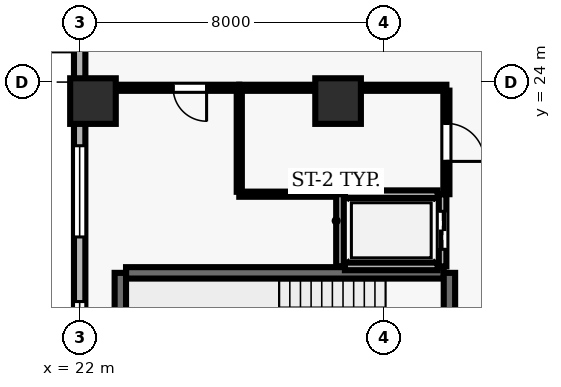
"""IFC4 building model, lengths in metres.
Left out: names, types, materials, properties, quantities, classifications, styles, units other than length and angle.
Written with IfcOpenShell. Run it as: python <this file> out.ifc"""

import sys

from ifc_helpers import new_model, si_unit, direction, frame, frame_2d, origin, origin_2d, place, context, subcontext, project, spatial, rectangle, extrude, element, fill, save


model = new_model("IFC4")
c1 = context("Model", 3, precision=1e-05, world=origin(), true_north=direction((0.0, 1.0)))
c2 = subcontext(c1, "Body", "Model", "MODEL_VIEW")
j1 = project(units=[si_unit("LENGTHUNIT", "METRE"), si_unit("PLANEANGLEUNIT", "RADIAN")], contexts=[c1])
p1 = place(None, origin())
s1 = spatial("IfcSite", under=j1, at=p1, CompositionType="ELEMENT")
p2 = place(p1, origin())
s2 = spatial("IfcBuilding", under=s1, at=p2, CompositionType="ELEMENT")
p3 = place(p2, frame((0.0, 0.0, 142.4)))
s3 = spatial("IfcBuildingStorey", under=s2, at=p3, CompositionType="ELEMENT", Elevation=142.4)
for number, where, z_axis, x_axis in (
    (1, (22.35, 23.5, 0.0), (0.0, 0.0, 1.0), (1.0, 0.0, 0.0)),
    (2, (28.8, 23.5, 0.0), (0.0, 0.0, 1.0), (1.0, 0.0, 0.0)),
):
    element("IfcColumn", number, at=place(p3, frame(where, z_axis=z_axis, x_axis=x_axis)), inside=s3, PredefinedType="COLUMN", context=c2, shape_type="SweptSolid", body=[
        extrude(rectangle(XDim=1.2, YDim=1.2, at=origin_2d()), origin(), (0.0, 0.0, 1.0), 3.9),
    ])
p4 = place(p3, frame((22.0, 46.1, 0.0), z_axis=(0.0, 0.0, 1.0), x_axis=(0.0, -1.0, 0.0)))
e3 = element("IfcWall", 3, at=p4, inside=s3, PredefinedType="SOLIDWALL", context=c2, shape_type="SweptSolid", body=[
    extrude(rectangle(XDim=43.6, YDim=0.3, at=frame_2d((21.8, 0.0))), origin(), (0.0, 0.0, 1.0), 3.69),
])
p5 = place(p4, frame((12.7, 0.0, 0.0)))
e4 = element("IfcOpeningElement", 4, at=p5, cuts=e3, PredefinedType="OPENING", context=c2, shape_type="SweptSolid", body=[
    extrude(rectangle(XDim=1.0, YDim=2.2, at=frame_2d((0.5, 1.1))), frame((0.0, 0.16, 0.0), z_axis=(0.0, -1.0, 0.0), x_axis=(1.0, 0.0, 0.0)), (0.0, 0.0, 1.0), 0.32),
])
p6 = place(p4, frame((1.525, 0.0, 0.9)))
e5 = element("IfcOpeningElement", 5, at=p6, cuts=e3, PredefinedType="OPENING", context=c2, shape_type="SweptSolid", body=[
    extrude(rectangle(XDim=2.4, YDim=2.2, at=frame_2d((1.2, 1.1))), frame((0.0, 0.16, 0.0), z_axis=(0.0, -1.0, 0.0), x_axis=(1.0, 0.0, 0.0)), (0.0, 0.0, 1.0), 0.32),
])
p7 = place(p4, frame((6.975, 0.0, 0.9)))
e6 = element("IfcOpeningElement", 6, at=p7, cuts=e3, PredefinedType="OPENING", context=c2, shape_type="SweptSolid", body=[
    extrude(rectangle(XDim=2.4, YDim=2.2, at=frame_2d((1.2, 1.1))), frame((0.0, 0.16, 0.0), z_axis=(0.0, -1.0, 0.0), x_axis=(1.0, 0.0, 0.0)), (0.0, 0.0, 1.0), 0.32),
])
p8 = place(p4, frame((16.975, 0.0, 0.9)))
e7 = element("IfcOpeningElement", 7, at=p8, cuts=e3, PredefinedType="OPENING", context=c2, shape_type="SweptSolid", body=[
    extrude(rectangle(XDim=2.4, YDim=2.2, at=frame_2d((1.2, 1.1))), frame((0.0, 0.16, 0.0), z_axis=(0.0, -1.0, 0.0), x_axis=(1.0, 0.0, 0.0)), (0.0, 0.0, 1.0), 0.32),
])
p9 = place(p4, frame((23.775, 0.0, 0.9)))
e8 = element("IfcOpeningElement", 8, at=p9, cuts=e3, PredefinedType="OPENING", context=c2, shape_type="SweptSolid", body=[
    extrude(rectangle(XDim=2.4, YDim=2.2, at=frame_2d((1.2, 1.1))), frame((0.0, 0.16, 0.0), z_axis=(0.0, -1.0, 0.0), x_axis=(1.0, 0.0, 0.0)), (0.0, 0.0, 1.0), 0.32),
])
p10 = place(p4, frame((27.875, 0.0, 0.9)))
e9 = element("IfcOpeningElement", 9, at=p10, cuts=e3, PredefinedType="OPENING", context=c2, shape_type="SweptSolid", body=[
    extrude(rectangle(XDim=2.4, YDim=2.2, at=frame_2d((1.2, 1.1))), frame((0.0, 0.16, 0.0), z_axis=(0.0, -1.0, 0.0), x_axis=(1.0, 0.0, 0.0)), (0.0, 0.0, 1.0), 0.32),
])
p11 = place(p4, frame((34.225, 0.0, 0.9)))
e10 = element("IfcOpeningElement", 10, at=p11, cuts=e3, PredefinedType="OPENING", context=c2, shape_type="SweptSolid", body=[
    extrude(rectangle(XDim=2.4, YDim=2.2, at=frame_2d((1.2, 1.1))), frame((0.0, 0.16, 0.0), z_axis=(0.0, -1.0, 0.0), x_axis=(1.0, 0.0, 0.0)), (0.0, 0.0, 1.0), 0.32),
])
p12 = place(p3, frame((31.58, 18.98, 0.0), z_axis=(0.0, 0.0, 1.0), x_axis=(-1.0, 0.0, 0.0)))
e11 = element("IfcWall", 11, at=p12, inside=s3, PredefinedType="SHEAR", context=c2, shape_type="SweptSolid", body=[
    extrude(rectangle(XDim=8.36, YDim=0.3, at=frame_2d((4.18, 0.0))), origin(), (0.0, 0.0, 1.0), 3.69),
])
p13 = place(p3, frame((23.07, 18.98, 0.0), z_axis=(0.0, 0.0, 1.0), x_axis=(0.0, -1.0, 0.0)))
e12 = element("IfcWall", 12, at=p13, inside=s3, PredefinedType="SHEAR", context=c2, shape_type="SweptSolid", body=[
    extrude(rectangle(XDim=3.51, YDim=0.3, at=frame_2d((1.755, 0.0))), origin(), (0.0, 0.0, 1.0), 3.69),
])
p14 = place(p3, frame((31.73, 15.47, 0.0), z_axis=(0.0, 0.0, 1.0), x_axis=(0.0, 1.0, 0.0)))
e13 = element("IfcWall", 13, at=p14, inside=s3, PredefinedType="SHEAR", context=c2, shape_type="SweptSolid", body=[
    extrude(rectangle(XDim=3.51, YDim=0.3, at=frame_2d((1.755, 0.0))), origin(), (0.0, 0.0, 1.0), 3.69),
])
p15 = place(p14, frame((1.18, 0.0, 0.0)))
e14 = element("IfcOpeningElement", 14, at=p15, cuts=e13, PredefinedType="OPENING", context=c2, shape_type="SweptSolid", body=[
    extrude(rectangle(XDim=1.15, YDim=2.15, at=frame_2d((0.575, 1.075))), frame((0.0, 0.16, 0.0), z_axis=(0.0, -1.0, 0.0), x_axis=(1.0, 0.0, 0.0)), (0.0, 0.0, 1.0), 0.32),
])
p16 = place(p3, frame((28.85, 21.05, 0.0), z_axis=(0.0, 0.0, 1.0), x_axis=(0.0, -1.0, 0.0)))
e15 = element("IfcWall", 15, at=p16, inside=s3, PredefinedType="SOLIDWALL", context=c2, shape_type="SweptSolid", body=[
    extrude(rectangle(XDim=1.9, YDim=0.2, at=frame_2d((0.95, 0.0))), origin(), (0.0, 0.0, 1.0), 3.69),
])
p17 = place(p3, frame((31.55, 19.15, 0.0), z_axis=(0.0, 0.0, 1.0), x_axis=(0.0, 1.0, 0.0)))
e16 = element("IfcWall", 16, at=p17, inside=s3, PredefinedType="SOLIDWALL", context=c2, shape_type="SweptSolid", body=[
    extrude(rectangle(XDim=1.9, YDim=0.2, at=frame_2d((0.95, 0.0))), origin(), (0.0, 0.0, 1.0), 3.69),
])
p18 = place(p17, frame((0.45, 0.0, 0.0)))
e17 = element("IfcOpeningElement", 17, at=p18, cuts=e16, PredefinedType="OPENING", context=c2, shape_type="SweptSolid", body=[
    extrude(rectangle(XDim=1.0, YDim=2.1, at=frame_2d((0.5, 1.05))), frame((0.0, 0.11, 0.0), z_axis=(0.0, -1.0, 0.0), x_axis=(1.0, 0.0, 0.0)), (0.0, 0.0, 1.0), 0.22),
])
for number, where, z_axis, x_axis in (
    (18, (28.98, 19.15, 0.0), (0.0, 0.0, 1.0), (1.0, 0.0, 0.0)),
    (19, (31.42, 21.05, 0.0), (0.0, 0.0, 1.0), (-1.0, 0.0, 0.0)),
):
    element("IfcWall", number, at=place(p3, frame(where, z_axis=z_axis, x_axis=x_axis)), inside=s3, PredefinedType="SOLIDWALL", context=c2, shape_type="SweptSolid", body=[
        extrude(rectangle(XDim=2.44, YDim=0.2, at=frame_2d((1.22, 0.0))), origin(), (0.0, 0.0, 1.0), 3.69),
    ])
p19 = place(p3, frame((26.2, 21.05, 0.0), z_axis=(0.0, 0.0, 1.0), x_axis=(1.0, 0.0, 0.0)))
e20 = element("IfcWall", 20, at=p19, inside=s3, PredefinedType="PARTITIONING", context=c2, shape_type="SweptSolid", body=[
    extrude(rectangle(XDim=2.52, YDim=0.135, at=frame_2d((1.26, 0.0))), origin(), (0.0, 0.0, 1.0), 3.69),
])
p20 = place(p3, frame((26.2, 23.85, 0.0), z_axis=(0.0, 0.0, 1.0), x_axis=(-1.0, 0.0, 0.0)))
e21 = element("IfcWall", 21, at=p20, inside=s3, PredefinedType="PARTITIONING", context=c2, shape_type="SweptSolid", body=[
    extrude(rectangle(XDim=4.0, YDim=0.16, at=frame_2d((2.0, 0.0))), origin(), (0.0, 0.0, 1.0), 3.074),
])
p21 = place(p20, frame((0.86, 0.0, 0.0)))
e22 = element("IfcOpeningElement", 22, at=p21, cuts=e21, PredefinedType="OPENING", context=c2, shape_type="SweptSolid", body=[
    extrude(rectangle(XDim=0.88, YDim=2.1, at=frame_2d((0.44, 1.05))), frame((0.0, 0.09, 0.0), z_axis=(0.0, -1.0, 0.0), x_axis=(1.0, 0.0, 0.0)), (0.0, 0.0, 1.0), 0.18),
])
p22 = place(p3, frame((31.65, 23.85, 0.0), z_axis=(0.0, 0.0, 1.0), x_axis=(-1.0, 0.0, 0.0)))
e23 = element("IfcWall", 23, at=p22, inside=s3, PredefinedType="PARTITIONING", context=c2, shape_type="SweptSolid", body=[
    extrude(rectangle(XDim=5.45, YDim=0.16, at=frame_2d((2.725, 0.0))), origin(), (0.0, 0.0, 1.0), 3.074),
])
p23 = place(p3, frame((26.2, 23.775, 0.0), z_axis=(0.0, 0.0, 1.0), x_axis=(0.0, -1.0, 0.0)))
e24 = element("IfcWall", 24, at=p23, inside=s3, PredefinedType="PARTITIONING", context=c2, shape_type="SweptSolid", body=[
    extrude(rectangle(XDim=2.662, YDim=0.135, at=frame_2d((1.331, 0.0))), origin(), (0.0, 0.0, 1.0), 3.69),
])
p24 = place(p3, frame((31.65, 23.775, 0.0), z_axis=(0.0, 0.0, 1.0), x_axis=(0.0, -1.0, 0.0)))
e25 = element("IfcWall", 25, at=p24, inside=s3, PredefinedType="PARTITIONING", context=c2, shape_type="SweptSolid", body=[
    extrude(rectangle(XDim=2.725, YDim=0.16, at=frame_2d((1.362, 0.0))), origin(), (0.0, 0.0, 1.0), 3.69),
])
p25 = place(p24, frame((0.862, 0.0, 0.0)))
e26 = element("IfcOpeningElement", 26, at=p25, cuts=e25, PredefinedType="OPENING", context=c2, shape_type="SweptSolid", body=[
    extrude(rectangle(XDim=1.0, YDim=2.1, at=frame_2d((0.5, 1.05))), frame((0.0, 0.09, 0.0), z_axis=(0.0, -1.0, 0.0), x_axis=(1.0, 0.0, 0.0)), (0.0, 0.0, 1.0), 0.18),
])
p26 = place(p9, origin())
e27 = element("IfcWindow", 27, at=p26, inside=s3, PartitioningType="SINGLE_PANEL", PredefinedType="WINDOW", context=c2, shape_type="SweptSolid", body=[
    extrude(rectangle(XDim=2.4, YDim=2.2, at=frame_2d((1.2, 1.1))), frame((0.0, 0.03, 0.0), z_axis=(0.0, -1.0, 0.0), x_axis=(1.0, 0.0, 0.0)), (0.0, 0.0, 1.0), 0.06),
])
fill(e8, e27)
p27 = place(p10, origin())
e28 = element("IfcWindow", 28, at=p27, inside=s3, PartitioningType="SINGLE_PANEL", PredefinedType="WINDOW", context=c2, shape_type="SweptSolid", body=[
    extrude(rectangle(XDim=2.4, YDim=2.2, at=frame_2d((1.2, 1.1))), frame((0.0, 0.03, 0.0), z_axis=(0.0, -1.0, 0.0), x_axis=(1.0, 0.0, 0.0)), (0.0, 0.0, 1.0), 0.06),
])
fill(e9, e28)
p28 = place(p18, origin())
e29 = element("IfcDoor", 29, at=p28, inside=s3, OperationType="DOUBLE_DOOR_SLIDING", PredefinedType="DOOR", context=c2, shape_type="SweptSolid", body=[
    extrude(rectangle(XDim=1.0, YDim=2.1, at=frame_2d((0.5, 1.05))), frame((0.0, 0.025, 0.0), z_axis=(0.0, -1.0, 0.0), x_axis=(1.0, 0.0, 0.0)), (0.0, 0.0, 1.0), 0.05),
])
fill(e17, e29)
p29 = place(p25, origin())
e30 = element("IfcDoor", 30, at=p29, inside=s3, OperationType="SINGLE_SWING_RIGHT", PredefinedType="DOOR", context=c2, shape_type="SweptSolid", body=[
    extrude(rectangle(XDim=1.0, YDim=2.1, at=frame_2d((0.5, 1.05))), frame((0.0, 0.025, 0.0), z_axis=(0.0, -1.0, 0.0), x_axis=(1.0, 0.0, 0.0)), (0.0, 0.0, 1.0), 0.05),
])
fill(e26, e30)
p30 = place(p21, origin())
e31 = element("IfcDoor", 31, at=p30, inside=s3, OperationType="SINGLE_SWING_LEFT", PredefinedType="DOOR", context=c2, shape_type="SweptSolid", body=[
    extrude(rectangle(XDim=0.88, YDim=2.1, at=frame_2d((0.44, 1.05))), frame((0.0, 0.025, 0.0), z_axis=(0.0, -1.0, 0.0), x_axis=(1.0, 0.0, 0.0)), (0.0, 0.0, 1.0), 0.05),
])
fill(e22, e31)
save(model, sys.argv[1])
